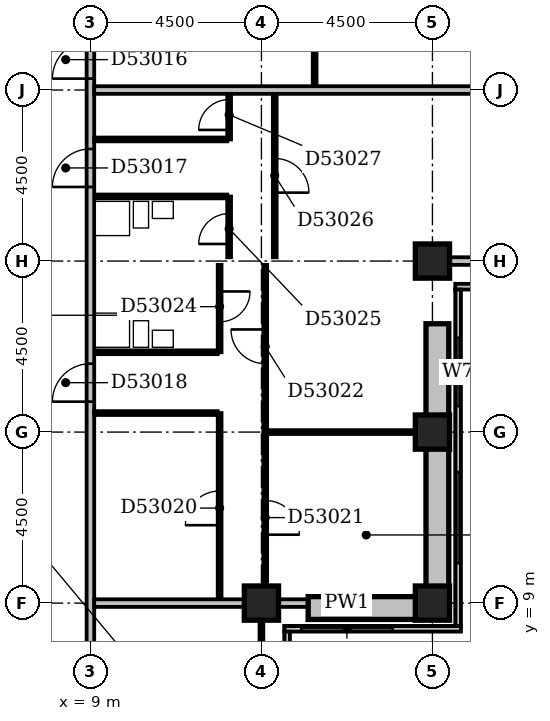
"""IFC4 building model, lengths in metres.
Left out: names, types, materials, properties, quantities, classifications, styles, units other than length and angle.
Written with IfcOpenShell. Run it as: python <this file> out.ifc"""

import sys

from ifc_helpers import new_model, si_unit, direction, frame, frame_2d, origin, origin_2d, place, context, subcontext, project, spatial, rectangle, extrude, element, fill, save


model = new_model("IFC4")
c1 = context("Model", 3, precision=1e-05, world=origin(), true_north=direction((0.0, 1.0)))
c2 = subcontext(c1, "Body", "Model", "MODEL_VIEW")
j1 = project(units=[si_unit("LENGTHUNIT", "METRE"), si_unit("PLANEANGLEUNIT", "RADIAN")], contexts=[c1])
p1 = place(None, origin())
s1 = spatial("IfcSite", under=j1, at=p1, CompositionType="ELEMENT")
p2 = place(p1, origin())
s2 = spatial("IfcBuilding", under=s1, at=p2, CompositionType="ELEMENT")
p3 = place(p2, frame((0.0, 0.0, 207.8)))
s3 = spatial("IfcBuildingStorey", under=s2, at=p3, CompositionType="ELEMENT", Elevation=207.8)
for number, where, z_axis, x_axis in (
    (1, (13.5, 9.0, -0.3), (0.0, 0.0, 1.0), (1.0, 0.0, 0.0)),
    (2, (18.0, 9.0, -0.3), (0.0, 0.0, 1.0), (1.0, 0.0, 0.0)),
    (3, (18.0, 13.5, -0.3), (0.0, 0.0, 1.0), (1.0, 0.0, 0.0)),
    (4, (18.0, 18.0, -0.3), (0.0, 0.0, 1.0), (1.0, 0.0, 0.0)),
):
    element("IfcColumn", number, at=place(p3, frame(where, z_axis=z_axis, x_axis=x_axis)), inside=s3, PredefinedType="COLUMN", context=c2, shape_type="SweptSolid", body=[
        extrude(rectangle(XDim=0.9, YDim=0.9, at=origin_2d()), origin(), (0.0, 0.0, 1.0), 3.55),
    ])
p4 = place(p3, frame((14.175, 3.9, 0.0), z_axis=(0.0, 0.0, 1.0), x_axis=(0.0, 1.0, 0.0)))
e5 = element("IfcWall", 5, at=p4, inside=s3, PredefinedType="STANDARD", context=c2, shape_type="SweptSolid", body=[
    extrude(rectangle(XDim=4.35, YDim=0.15, at=frame_2d((2.175, 0.0))), origin(), (0.0, 0.0, 1.0), 2.7),
])
p5 = place(p4, frame((1.65, 0.0, 0.6)))
e6 = element("IfcOpeningElement", 6, at=p5, cuts=e5, PredefinedType="OPENING", context=c2, shape_type="SweptSolid", body=[
    extrude(rectangle(XDim=2.4, YDim=1.8, at=frame_2d((1.2, 0.9))), frame((0.0, 0.087, 0.0), z_axis=(0.0, -1.0, 0.0), x_axis=(1.0, 0.0, 0.0)), (0.0, 0.0, 1.0), 0.174),
])
p6 = place(p3, frame((14.1, 8.325, 0.0), z_axis=(0.0, 0.0, 1.0), x_axis=(1.0, 0.0, 0.0)))
e7 = element("IfcWall", 7, at=p6, inside=s3, PredefinedType="STANDARD", context=c2, shape_type="SweptSolid", body=[
    extrude(rectangle(XDim=4.65, YDim=0.15, at=frame_2d((2.325, 0.0))), origin(), (0.0, 0.0, 1.0), 2.7),
])
p7 = place(p6, frame((0.45, 0.0, 0.6)))
e8 = element("IfcOpeningElement", 8, at=p7, cuts=e7, PredefinedType="OPENING", context=c2, shape_type="SweptSolid", body=[
    extrude(rectangle(XDim=2.4, YDim=1.8, at=frame_2d((1.2, 0.9))), frame((0.0, 0.087, 0.0), z_axis=(0.0, -1.0, 0.0), x_axis=(1.0, 0.0, 0.0)), (0.0, 0.0, 1.0), 0.174),
])
p8 = place(p3, frame((18.675, 8.4, 0.0), z_axis=(0.0, 0.0, 1.0), x_axis=(0.0, 1.0, 0.0)))
e9 = element("IfcWall", 9, at=p8, inside=s3, PredefinedType="STANDARD", context=c2, shape_type="SweptSolid", body=[
    extrude(rectangle(XDim=8.85, YDim=0.15, at=frame_2d((4.425, 0.0))), origin(), (0.0, 0.0, 1.0), 2.7),
])
p9 = place(p8, frame((1.65, 0.0, 0.6)))
e10 = element("IfcOpeningElement", 10, at=p9, cuts=e9, PredefinedType="OPENING", context=c2, shape_type="SweptSolid", body=[
    extrude(rectangle(XDim=2.4, YDim=1.8, at=frame_2d((1.2, 0.9))), frame((0.0, 0.087, 0.0), z_axis=(0.0, -1.0, 0.0), x_axis=(1.0, 0.0, 0.0)), (0.0, 0.0, 1.0), 0.174),
])
p10 = place(p8, frame((5.781, 0.0, 0.6)))
e11 = element("IfcOpeningElement", 11, at=p10, cuts=e9, PredefinedType="OPENING", context=c2, shape_type="SweptSolid", body=[
    extrude(rectangle(XDim=1.8, YDim=1.8, at=frame_2d((0.9, 0.9))), frame((0.0, 0.087, 0.0), z_axis=(0.0, -1.0, 0.0), x_axis=(1.0, 0.0, 0.0)), (0.0, 0.0, 1.0), 0.174),
])
p11 = place(p3, frame((18.6, 17.325, 0.0), z_axis=(0.0, 0.0, 1.0), x_axis=(1.0, 0.0, 0.0)))
e12 = element("IfcWall", 12, at=p11, inside=s3, PredefinedType="STANDARD", context=c2, shape_type="SweptSolid", body=[
    extrude(rectangle(XDim=4.65, YDim=0.15, at=frame_2d((2.325, 0.0))), origin(), (0.0, 0.0, 1.0), 2.7),
])
p12 = place(p11, frame((0.731, 0.0, 0.6)))
e13 = element("IfcOpeningElement", 13, at=p12, cuts=e12, PredefinedType="OPENING", context=c2, shape_type="SweptSolid", body=[
    extrude(rectangle(XDim=2.4, YDim=1.8, at=frame_2d((1.2, 0.9))), frame((0.0, 0.087, 0.0), z_axis=(0.0, -1.0, 0.0), x_axis=(1.0, 0.0, 0.0)), (0.0, 0.0, 1.0), 0.174),
])
p13 = place(p3, frame((18.13, 16.35, 3.6), z_axis=(0.0, 0.0, 1.0), x_axis=(0.0, -1.0, 0.0)))
e14 = element("IfcWall", 14, at=p13, inside=s3, PredefinedType="STANDARD", context=c2, shape_type="SweptSolid", body=[
    extrude(rectangle(XDim=7.38, YDim=0.6, at=frame_2d((3.69, 0.0))), origin(), (0.0, 0.0, 1.0), 0.6),
])
p14 = place(p3, frame((18.03, 8.87, 3.6), z_axis=(0.0, 0.0, 1.0), x_axis=(-1.0, 0.0, 0.0)))
e15 = element("IfcWall", 15, at=p14, inside=s3, PredefinedType="STANDARD", context=c2, shape_type="SweptSolid", body=[
    extrude(rectangle(XDim=3.3, YDim=0.6, at=frame_2d((1.65, 0.0))), origin(), (0.0, 0.0, 1.0), 0.6),
])
p15 = place(p3, frame((13.5, 4.95, 0.0), z_axis=(0.0, 0.0, 1.0), x_axis=(0.0, 1.0, 0.0)))
e16 = element("IfcWall", 16, at=p15, inside=s3, PredefinedType="PARTITIONING", context=c2, shape_type="SweptSolid", body=[
    extrude(rectangle(XDim=3.6, YDim=0.1, at=frame_2d((1.8, 0.0))), origin(), (0.0, 0.0, 1.0), 2.7),
])
p16 = place(p3, frame((9.0, 5.0, 0.0), z_axis=(0.0, 0.0, 1.0), x_axis=(0.0, 1.0, 0.0)))
e17 = element("IfcWall", 17, at=p16, inside=s3, PredefinedType="PARTITIONING", context=c2, shape_type="SweptSolid", body=[
    extrude(rectangle(XDim=31.0, YDim=0.2, at=frame_2d((15.5, 0.0))), origin(), (0.0, 0.0, 1.0), 3.25),
])
p17 = place(p16, frame((17.8, 0.0, 0.0)))
e18 = element("IfcOpeningElement", 18, at=p17, cuts=e17, PredefinedType="OPENING", context=c2, shape_type="SweptSolid", body=[
    extrude(rectangle(XDim=1.0, YDim=2.1, at=frame_2d((0.5, 1.05))), frame((0.0, 0.112, 0.0), z_axis=(0.0, -1.0, 0.0), x_axis=(1.0, 0.0, 0.0)), (0.0, 0.0, 1.0), 0.224),
])
p18 = place(p16, frame((14.95, 0.0, 0.0)))
e19 = element("IfcOpeningElement", 19, at=p18, cuts=e17, PredefinedType="OPENING", context=c2, shape_type="SweptSolid", body=[
    extrude(rectangle(XDim=1.0, YDim=2.1, at=frame_2d((0.5, 1.05))), frame((0.0, 0.112, 0.0), z_axis=(0.0, -1.0, 0.0), x_axis=(1.0, 0.0, 0.0)), (0.0, 0.0, 1.0), 0.224),
])
p19 = place(p16, frame((9.3, 0.0, 0.0)))
e20 = element("IfcOpeningElement", 20, at=p19, cuts=e17, PredefinedType="OPENING", context=c2, shape_type="SweptSolid", body=[
    extrude(rectangle(XDim=1.0, YDim=2.1, at=frame_2d((0.5, 1.05))), frame((0.0, 0.112, 0.0), z_axis=(0.0, -1.0, 0.0), x_axis=(1.0, 0.0, 0.0)), (0.0, 0.0, 1.0), 0.224),
])
p20 = place(p16, frame((1.5, 0.0, 0.0)))
e21 = element("IfcOpeningElement", 21, at=p20, cuts=e17, PredefinedType="OPENING", context=c2, shape_type="SweptSolid", body=[
    extrude(rectangle(XDim=0.9, YDim=2.1, at=frame_2d((0.45, 1.05))), frame((0.0, 0.112, 0.0), z_axis=(0.0, -1.0, 0.0), x_axis=(1.0, 0.0, 0.0)), (0.0, 0.0, 1.0), 0.224),
])
p21 = place(p3, frame((9.1, 9.0, 0.0), z_axis=(0.0, 0.0, 1.0), x_axis=(1.0, 0.0, 0.0)))
e22 = element("IfcWall", 22, at=p21, inside=s3, PredefinedType="PARTITIONING", context=c2, shape_type="SweptSolid", body=[
    extrude(rectangle(XDim=3.95, YDim=0.2, at=frame_2d((1.975, 0.0))), origin(), (0.0, 0.0, 1.0), 3.25),
])
p22 = place(p3, frame((13.95, 9.0, 0.0), z_axis=(0.0, 0.0, 1.0), x_axis=(1.0, 0.0, 0.0)))
e23 = element("IfcWall", 23, at=p22, inside=s3, PredefinedType="PARTITIONING", context=c2, shape_type="SweptSolid", body=[
    extrude(rectangle(XDim=3.6, YDim=0.2, at=frame_2d((1.8, 0.0))), origin(), (0.0, 0.0, 1.0), 2.7),
])
p23 = place(p3, frame((12.4, 9.1, 0.0), z_axis=(0.0, 0.0, 1.0), x_axis=(0.0, 1.0, 0.0)))
e24 = element("IfcWall", 24, at=p23, inside=s3, PredefinedType="PARTITIONING", context=c2, shape_type="SweptSolid", body=[
    extrude(rectangle(XDim=4.9, YDim=0.1, at=frame_2d((2.45, 0.0))), origin(), (0.0, 0.0, 1.0), 3.25),
])
p24 = place(p23, frame((1.95, 0.0, 0.0)))
e25 = element("IfcOpeningElement", 25, at=p24, cuts=e24, PredefinedType="OPENING", context=c2, shape_type="SweptSolid", body=[
    extrude(rectangle(XDim=0.9, YDim=2.1, at=frame_2d((0.45, 1.05))), frame((0.0, 0.062, 0.0), z_axis=(0.0, -1.0, 0.0), x_axis=(1.0, 0.0, 0.0)), (0.0, 0.0, 1.0), 0.124),
])
p25 = place(p3, frame((13.6, 9.45, 0.0), z_axis=(0.0, 0.0, 1.0), x_axis=(0.0, 1.0, 0.0)))
e26 = element("IfcWall", 26, at=p25, inside=s3, PredefinedType="PARTITIONING", context=c2, shape_type="SweptSolid", body=[
    extrude(rectangle(XDim=8.45, YDim=0.1, at=frame_2d((4.225, 0.0))), origin(), (0.0, 0.0, 1.0), 3.25),
])
p26 = place(p25, frame((1.35, 0.0, 0.0)))
e27 = element("IfcOpeningElement", 27, at=p26, cuts=e26, PredefinedType="OPENING", context=c2, shape_type="SweptSolid", body=[
    extrude(rectangle(XDim=0.9, YDim=2.1, at=frame_2d((0.45, 1.05))), frame((0.0, 0.062, 0.0), z_axis=(0.0, -1.0, 0.0), x_axis=(1.0, 0.0, 0.0)), (0.0, 0.0, 1.0), 0.124),
])
p27 = place(p25, frame((5.85, 0.0, 0.0)))
e28 = element("IfcOpeningElement", 28, at=p27, cuts=e26, PredefinedType="OPENING", context=c2, shape_type="SweptSolid", body=[
    extrude(rectangle(XDim=0.9, YDim=2.1, at=frame_2d((0.45, 1.05))), frame((0.0, 0.062, 0.0), z_axis=(0.0, -1.0, 0.0), x_axis=(1.0, 0.0, 0.0)), (0.0, 0.0, 1.0), 0.124),
])
p28 = place(p3, frame((13.65, 13.5, 0.0), z_axis=(0.0, 0.0, 1.0), x_axis=(1.0, 0.0, 0.0)))
e29 = element("IfcWall", 29, at=p28, inside=s3, PredefinedType="PARTITIONING", context=c2, shape_type="SweptSolid", body=[
    extrude(rectangle(XDim=3.9, YDim=0.1, at=frame_2d((1.95, 0.0))), origin(), (0.0, 0.0, 1.0), 3.25),
])
p29 = place(p3, frame((9.1, 14.0, 0.0), z_axis=(0.0, 0.0, 1.0), x_axis=(1.0, 0.0, 0.0)))
e30 = element("IfcWall", 30, at=p29, inside=s3, PredefinedType="PARTITIONING", context=c2, shape_type="SweptSolid", body=[
    extrude(rectangle(XDim=3.25, YDim=0.1, at=frame_2d((1.625, 0.0))), origin(), (0.0, 0.0, 1.0), 3.25),
])
p30 = place(p3, frame((9.1, 15.6, 0.0), z_axis=(0.0, 0.0, 1.0), x_axis=(1.0, 0.0, 0.0)))
e31 = element("IfcWall", 31, at=p30, inside=s3, PredefinedType="PLUMBINGWALL", context=c2, shape_type="SweptSolid", body=[
    extrude(rectangle(XDim=3.25, YDim=0.1, at=frame_2d((1.625, 0.0))), origin(), (0.0, 0.0, 1.0), 3.25),
])
p31 = place(p3, frame((12.4, 15.6, 0.0), z_axis=(0.0, 0.0, 1.0), x_axis=(0.0, 1.0, 0.0)))
e32 = element("IfcWall", 32, at=p31, inside=s3, PredefinedType="PARTITIONING", context=c2, shape_type="SweptSolid", body=[
    extrude(rectangle(XDim=2.3, YDim=0.1, at=frame_2d((1.15, 0.0))), origin(), (0.0, 0.0, 1.0), 3.25),
])
p32 = place(p31, frame((0.8, 0.0, 0.0)))
e33 = element("IfcOpeningElement", 33, at=p32, cuts=e32, PredefinedType="OPENING", context=c2, shape_type="SweptSolid", body=[
    extrude(rectangle(XDim=0.8, YDim=2.1, at=frame_2d((0.4, 1.05))), frame((0.0, 0.062, 0.0), z_axis=(0.0, -1.0, 0.0), x_axis=(1.0, 0.0, 0.0)), (0.0, 0.0, 1.0), 0.124),
])
p33 = place(p3, frame((18.45, 18.0, 0.0), z_axis=(0.0, 0.0, 1.0), x_axis=(1.0, 0.0, 0.0)))
e34 = element("IfcWall", 34, at=p33, inside=s3, PredefinedType="PARTITIONING", context=c2, shape_type="SweptSolid", body=[
    extrude(rectangle(XDim=3.6, YDim=0.2, at=frame_2d((1.8, 0.0))), origin(), (0.0, 0.0, 1.0), 2.7),
])
p34 = place(p3, frame((12.65, 18.1, 0.0), z_axis=(0.0, 0.0, 1.0), x_axis=(0.0, 1.0, 0.0)))
e35 = element("IfcWall", 35, at=p34, inside=s3, PredefinedType="PARTITIONING", context=c2, shape_type="SweptSolid", body=[
    extrude(rectangle(XDim=1.6, YDim=0.1, at=frame_2d((0.8, 0.0))), origin(), (0.0, 0.0, 1.0), 3.25),
])
p35 = place(p34, frame((0.35, 0.0, 0.0)))
e36 = element("IfcOpeningElement", 36, at=p35, cuts=e35, PredefinedType="OPENING", context=c2, shape_type="SweptSolid", body=[
    extrude(rectangle(XDim=0.8, YDim=2.1, at=frame_2d((0.4, 1.05))), frame((0.0, 0.062, 0.0), z_axis=(0.0, -1.0, 0.0), x_axis=(1.0, 0.0, 0.0)), (0.0, 0.0, 1.0), 0.124),
])
p36 = place(p3, frame((13.85, 18.1, 0.0), z_axis=(0.0, 0.0, 1.0), x_axis=(0.0, 1.0, 0.0)))
e37 = element("IfcWall", 37, at=p36, inside=s3, PredefinedType="PARTITIONING", context=c2, shape_type="SweptSolid", body=[
    extrude(rectangle(XDim=4.3, YDim=0.1, at=frame_2d((2.15, 0.0))), origin(), (0.0, 0.0, 1.0), 3.25),
])
p37 = place(p36, frame((1.7, 0.0, 0.0)))
e38 = element("IfcOpeningElement", 38, at=p37, cuts=e37, PredefinedType="OPENING", context=c2, shape_type="SweptSolid", body=[
    extrude(rectangle(XDim=0.9, YDim=2.1, at=frame_2d((0.45, 1.05))), frame((0.0, 0.062, 0.0), z_axis=(0.0, -1.0, 0.0), x_axis=(1.0, 0.0, 0.0)), (0.0, 0.0, 1.0), 0.124),
])
p38 = place(p3, frame((9.1, 19.7, 0.0), z_axis=(0.0, 0.0, 1.0), x_axis=(1.0, 0.0, 0.0)))
e39 = element("IfcWall", 39, at=p38, inside=s3, PredefinedType="PLUMBINGWALL", context=c2, shape_type="SweptSolid", body=[
    extrude(rectangle(XDim=3.5, YDim=0.1, at=frame_2d((1.75, 0.0))), origin(), (0.0, 0.0, 1.0), 3.25),
])
p39 = place(p3, frame((9.1, 21.2, 0.0), z_axis=(0.0, 0.0, 1.0), x_axis=(1.0, 0.0, 0.0)))
e40 = element("IfcWall", 40, at=p39, inside=s3, PredefinedType="PARTITIONING", context=c2, shape_type="SweptSolid", body=[
    extrude(rectangle(XDim=3.5, YDim=0.1, at=frame_2d((1.75, 0.0))), origin(), (0.0, 0.0, 1.0), 3.25),
])
p40 = place(p3, frame((12.65, 21.2, 0.0), z_axis=(0.0, 0.0, 1.0), x_axis=(0.0, 1.0, 0.0)))
e41 = element("IfcWall", 41, at=p40, inside=s3, PredefinedType="PARTITIONING", context=c2, shape_type="SweptSolid", body=[
    extrude(rectangle(XDim=1.2, YDim=0.1, at=frame_2d((0.6, 0.0))), origin(), (0.0, 0.0, 1.0), 3.25),
])
p41 = place(p40, frame((0.25, 0.0, 0.0)))
e42 = element("IfcOpeningElement", 42, at=p41, cuts=e41, PredefinedType="OPENING", context=c2, shape_type="SweptSolid", body=[
    extrude(rectangle(XDim=0.8, YDim=2.1, at=frame_2d((0.4, 1.05))), frame((0.0, 0.062, 0.0), z_axis=(0.0, -1.0, 0.0), x_axis=(1.0, 0.0, 0.0)), (0.0, 0.0, 1.0), 0.124),
])
p42 = place(p3, frame((9.1, 22.5, 0.0), z_axis=(0.0, 0.0, 1.0), x_axis=(1.0, 0.0, 0.0)))
e43 = element("IfcWall", 43, at=p42, inside=s3, PredefinedType="PARTITIONING", context=c2, shape_type="SweptSolid", body=[
    extrude(rectangle(XDim=12.95, YDim=0.2, at=frame_2d((6.475, 0.0))), origin(), (0.0, 0.0, 1.0), 3.25),
])
p43 = place(p3, frame((14.9, 22.6, 0.0), z_axis=(0.0, 0.0, 1.0), x_axis=(0.0, 1.0, 0.0)))
e44 = element("IfcWall", 44, at=p43, inside=s3, PredefinedType="PARTITIONING", context=c2, shape_type="SweptSolid", body=[
    extrude(rectangle(XDim=13.3, YDim=0.1, at=frame_2d((6.65, 0.0))), origin(), (0.0, 0.0, 1.0), 3.25),
])
p44 = place(p43, frame((1.7, 0.0, 0.0)))
e45 = element("IfcOpeningElement", 45, at=p44, cuts=e44, PredefinedType="OPENING", context=c2, shape_type="SweptSolid", body=[
    extrude(rectangle(XDim=0.9, YDim=2.1, at=frame_2d((0.45, 1.05))), frame((0.0, 0.062, 0.0), z_axis=(0.0, -1.0, 0.0), x_axis=(1.0, 0.0, 0.0)), (0.0, 0.0, 1.0), 0.124),
])
p45 = place(p43, frame((6.2, 0.0, 0.0)))
e46 = element("IfcOpeningElement", 46, at=p45, cuts=e44, PredefinedType="OPENING", context=c2, shape_type="SweptSolid", body=[
    extrude(rectangle(XDim=0.9, YDim=2.1, at=frame_2d((0.45, 1.05))), frame((0.0, 0.062, 0.0), z_axis=(0.0, -1.0, 0.0), x_axis=(1.0, 0.0, 0.0)), (0.0, 0.0, 1.0), 0.124),
])
p46 = place(p43, frame((10.7, 0.0, 0.0)))
e47 = element("IfcOpeningElement", 47, at=p46, cuts=e44, PredefinedType="OPENING", context=c2, shape_type="SweptSolid", body=[
    extrude(rectangle(XDim=0.9, YDim=2.1, at=frame_2d((0.45, 1.05))), frame((0.0, 0.062, 0.0), z_axis=(0.0, -1.0, 0.0), x_axis=(1.0, 0.0, 0.0)), (0.0, 0.0, 1.0), 0.124),
])
p47 = place(p7, origin())
e48 = element("IfcWindow", 48, at=p47, inside=s3, PartitioningType="SINGLE_PANEL", PredefinedType="WINDOW", context=c2, shape_type="SweptSolid", body=[
    extrude(rectangle(XDim=2.4, YDim=1.8, at=frame_2d((1.2, 0.9))), frame((0.0, 0.03, 0.0), z_axis=(0.0, -1.0, 0.0), x_axis=(1.0, 0.0, 0.0)), (0.0, 0.0, 1.0), 0.06),
])
fill(e8, e48)
p48 = place(p9, origin())
e49 = element("IfcWindow", 49, at=p48, inside=s3, PartitioningType="SINGLE_PANEL", PredefinedType="WINDOW", context=c2, shape_type="SweptSolid", body=[
    extrude(rectangle(XDim=2.4, YDim=1.8, at=frame_2d((1.2, 0.9))), frame((0.0, 0.03, 0.0), z_axis=(0.0, -1.0, 0.0), x_axis=(1.0, 0.0, 0.0)), (0.0, 0.0, 1.0), 0.06),
])
fill(e10, e49)
p49 = place(p10, origin())
e50 = element("IfcWindow", 50, at=p49, inside=s3, PartitioningType="SINGLE_PANEL", PredefinedType="WINDOW", context=c2, shape_type="SweptSolid", body=[
    extrude(rectangle(XDim=1.8, YDim=1.8, at=frame_2d((0.9, 0.9))), frame((0.0, 0.03, 0.0), z_axis=(0.0, -1.0, 0.0), x_axis=(1.0, 0.0, 0.0)), (0.0, 0.0, 1.0), 0.06),
])
fill(e11, e50)
p50 = place(p17, origin())
e51 = element("IfcDoor", 51, at=p50, inside=s3, OperationType="SINGLE_SWING_LEFT", PredefinedType="DOOR", context=c2, shape_type="SweptSolid", body=[
    extrude(rectangle(XDim=1.0, YDim=2.1, at=frame_2d((0.5, 1.05))), frame((0.0, 0.025, 0.0), z_axis=(0.0, -1.0, 0.0), x_axis=(1.0, 0.0, 0.0)), (0.0, 0.0, 1.0), 0.05),
])
fill(e18, e51)
p51 = place(p18, origin())
e52 = element("IfcDoor", 52, at=p51, inside=s3, OperationType="SINGLE_SWING_LEFT", PredefinedType="DOOR", context=c2, shape_type="SweptSolid", body=[
    extrude(rectangle(XDim=1.0, YDim=2.1, at=frame_2d((0.5, 1.05))), frame((0.0, 0.025, 0.0), z_axis=(0.0, -1.0, 0.0), x_axis=(1.0, 0.0, 0.0)), (0.0, 0.0, 1.0), 0.05),
])
fill(e19, e52)
p52 = place(p19, origin())
e53 = element("IfcDoor", 53, at=p52, inside=s3, OperationType="SINGLE_SWING_LEFT", PredefinedType="DOOR", context=c2, shape_type="SweptSolid", body=[
    extrude(rectangle(XDim=1.0, YDim=2.1, at=frame_2d((0.5, 1.05))), frame((0.0, 0.025, 0.0), z_axis=(0.0, -1.0, 0.0), x_axis=(1.0, 0.0, 0.0)), (0.0, 0.0, 1.0), 0.05),
])
fill(e20, e53)
p53 = place(p24, origin())
e54 = element("IfcDoor", 54, at=p53, inside=s3, OperationType="SINGLE_SWING_LEFT", PredefinedType="DOOR", context=c2, shape_type="SweptSolid", body=[
    extrude(rectangle(XDim=0.9, YDim=2.1, at=frame_2d((0.45, 1.05))), frame((0.0, 0.025, 0.0), z_axis=(0.0, -1.0, 0.0), x_axis=(1.0, 0.0, 0.0)), (0.0, 0.0, 1.0), 0.05),
])
fill(e25, e54)
p54 = place(p26, frame((0.9, 0.0, 0.0), z_axis=(0.0, 0.0, 1.0), x_axis=(-1.0, 0.0, 0.0)))
e55 = element("IfcDoor", 55, at=p54, inside=s3, OperationType="SINGLE_SWING_RIGHT", PredefinedType="DOOR", context=c2, shape_type="SweptSolid", body=[
    extrude(rectangle(XDim=0.9, YDim=2.1, at=frame_2d((0.45, 1.05))), frame((0.0, 0.025, 0.0), z_axis=(0.0, -1.0, 0.0), x_axis=(1.0, 0.0, 0.0)), (0.0, 0.0, 1.0), 0.05),
])
fill(e27, e55)
p55 = place(p27, frame((0.9, 0.0, 0.0), z_axis=(0.0, 0.0, 1.0), x_axis=(-1.0, 0.0, 0.0)))
e56 = element("IfcDoor", 56, at=p55, inside=s3, OperationType="SINGLE_SWING_LEFT", PredefinedType="DOOR", context=c2, shape_type="SweptSolid", body=[
    extrude(rectangle(XDim=0.9, YDim=2.1, at=frame_2d((0.45, 1.05))), frame((0.0, 0.025, 0.0), z_axis=(0.0, -1.0, 0.0), x_axis=(1.0, 0.0, 0.0)), (0.0, 0.0, 1.0), 0.05),
])
fill(e28, e56)
p56 = place(p32, origin())
e57 = element("IfcDoor", 57, at=p56, inside=s3, OperationType="SINGLE_SWING_RIGHT", PredefinedType="DOOR", context=c2, shape_type="SweptSolid", body=[
    extrude(rectangle(XDim=0.8, YDim=2.1, at=frame_2d((0.4, 1.05))), frame((0.0, 0.025, 0.0), z_axis=(0.0, -1.0, 0.0), x_axis=(1.0, 0.0, 0.0)), (0.0, 0.0, 1.0), 0.05),
])
fill(e33, e57)
p57 = place(p35, origin())
e58 = element("IfcDoor", 58, at=p57, inside=s3, OperationType="SINGLE_SWING_LEFT", PredefinedType="DOOR", context=c2, shape_type="SweptSolid", body=[
    extrude(rectangle(XDim=0.8, YDim=2.1, at=frame_2d((0.4, 1.05))), frame((0.0, 0.025, 0.0), z_axis=(0.0, -1.0, 0.0), x_axis=(1.0, 0.0, 0.0)), (0.0, 0.0, 1.0), 0.05),
])
fill(e36, e58)
p58 = place(p37, frame((0.9, 0.0, 0.0), z_axis=(0.0, 0.0, 1.0), x_axis=(-1.0, 0.0, 0.0)))
e59 = element("IfcDoor", 59, at=p58, inside=s3, OperationType="SINGLE_SWING_RIGHT", PredefinedType="DOOR", context=c2, shape_type="SweptSolid", body=[
    extrude(rectangle(XDim=0.9, YDim=2.1, at=frame_2d((0.45, 1.05))), frame((0.0, 0.025, 0.0), z_axis=(0.0, -1.0, 0.0), x_axis=(1.0, 0.0, 0.0)), (0.0, 0.0, 1.0), 0.05),
])
fill(e38, e59)
p59 = place(p41, origin())
e60 = element("IfcDoor", 60, at=p59, inside=s3, OperationType="SINGLE_SWING_LEFT", PredefinedType="DOOR", context=c2, shape_type="SweptSolid", body=[
    extrude(rectangle(XDim=0.8, YDim=2.1, at=frame_2d((0.4, 1.05))), frame((0.0, 0.025, 0.0), z_axis=(0.0, -1.0, 0.0), x_axis=(1.0, 0.0, 0.0)), (0.0, 0.0, 1.0), 0.05),
])
fill(e42, e60)
save(model, sys.argv[1])
